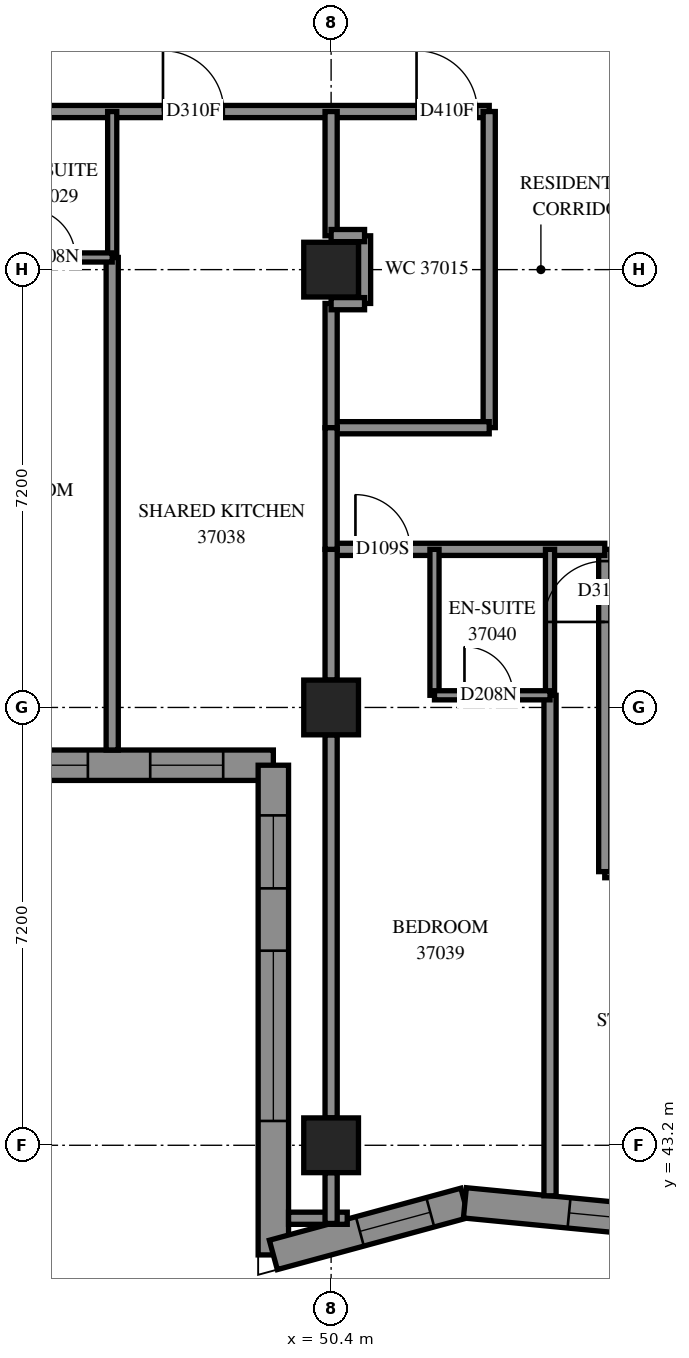
"""IFC4 building model, lengths in metres.
Left out: names, types, materials, properties, quantities, classifications, styles, units other than length and angle.
Written with IfcOpenShell. Run it as: python <this file> out.ifc"""

import sys

from ifc_helpers import new_model, si_unit, direction, frame, frame_2d, origin, origin_2d, place, context, subcontext, project, spatial, polyline, rectangle, outline, extrude, element, fill, save


model = new_model("IFC4")
c1 = context("Model", 3, precision=1e-05, world=origin(), true_north=direction((0.0, 1.0)))
c2 = subcontext(c1, "Body", "Model", "MODEL_VIEW")
j1 = project(units=[si_unit("LENGTHUNIT", "METRE"), si_unit("PLANEANGLEUNIT", "RADIAN")], contexts=[c1])
p1 = place(None, origin())
s1 = spatial("IfcSite", under=j1, at=p1, CompositionType="ELEMENT")
p2 = place(p1, origin())
s2 = spatial("IfcBuilding", under=s1, at=p2, CompositionType="ELEMENT")
p3 = place(p2, frame((0.0, 0.0, 138.8)))
s3 = spatial("IfcBuildingStorey", under=s2, at=p3, CompositionType="ELEMENT", Elevation=138.8)
for number, where, z_axis, x_axis in (
    (1, (50.4, 43.2, 0.0), (0.0, 0.0, 1.0), (1.0, 0.0, 0.0)),
    (2, (50.4, 50.4, 0.0), (0.0, 0.0, 1.0), (1.0, 0.0, 0.0)),
    (3, (50.4, 57.6, 0.0), (0.0, 0.0, 1.0), (1.0, 0.0, 0.0)),
):
    element("IfcColumn", number, at=place(p3, frame(where, z_axis=z_axis, x_axis=x_axis)), inside=s3, PredefinedType="COLUMN", context=c2, shape_type="SweptSolid", body=[
        extrude(rectangle(XDim=0.9, YDim=0.9, at=origin_2d()), origin(), (0.0, 0.0, 1.0), 3.1),
    ])
p4 = place(p3, frame((42.25, 49.45, 0.0), z_axis=(0.0, 0.0, 1.0), x_axis=(1.0, 0.0, 0.0)))
e4 = element("IfcWall", 4, at=p4, inside=s3, PredefinedType="SOLIDWALL", context=c2, shape_type="SweptSolid", body=[
    extrude(outline(polyline([(-0.25, -0.25), (6.95, -0.25), (7.45, 0.25), (0.25, 0.25), (-0.25, -0.25)])), origin(), (0.0, 0.0, 1.0), 3.1),
])
p5 = place(p4, frame((1.35, 0.0, 0.45)))
e5 = element("IfcOpeningElement", 5, at=p5, cuts=e4, PredefinedType="OPENING", context=c2, shape_type="SweptSolid", body=[
    extrude(rectangle(XDim=2.8, YDim=2.5, at=frame_2d((1.4, 1.25))), frame((0.0, 0.26, 0.0), z_axis=(0.0, -1.0, 0.0), x_axis=(1.0, 0.0, 0.0)), (0.0, 0.0, 1.0), 0.52),
])
p6 = place(p4, frame((5.175, 0.0, 0.45)))
e6 = element("IfcOpeningElement", 6, at=p6, cuts=e4, PredefinedType="OPENING", context=c2, shape_type="SweptSolid", body=[
    extrude(rectangle(XDim=1.2, YDim=2.5, at=frame_2d((0.6, 1.25))), frame((0.0, 0.26, 0.0), z_axis=(0.0, -1.0, 0.0), x_axis=(1.0, 0.0, 0.0)), (0.0, 0.0, 1.0), 0.52),
])
p7 = place(p3, frame((49.45, 49.45, 0.0), z_axis=(0.0, 0.0, 1.0), x_axis=(0.0, -1.0, 0.0)))
e7 = element("IfcWall", 7, at=p7, inside=s3, PredefinedType="SOLIDWALL", context=c2, shape_type="SweptSolid", body=[
    extrude(outline(polyline([(0.25, -0.25), (8.38, -0.25), (7.726, 0.25), (-0.25, 0.25), (0.25, -0.25)])), origin(), (0.0, 0.0, 1.0), 3.1),
])
p8 = place(p7, frame((3.05, 0.0, 0.45)))
e8 = element("IfcOpeningElement", 8, at=p8, cuts=e7, PredefinedType="OPENING", context=c2, shape_type="SweptSolid", body=[
    extrude(rectangle(XDim=2.8, YDim=2.5, at=frame_2d((1.4, 1.25))), frame((0.0, 0.26, 0.0), z_axis=(0.0, -1.0, 0.0), x_axis=(1.0, 0.0, 0.0)), (0.0, 0.0, 1.0), 0.52),
])
p9 = place(p7, frame((0.825, 0.0, 0.45)))
e9 = element("IfcOpeningElement", 9, at=p9, cuts=e7, PredefinedType="OPENING", context=c2, shape_type="SweptSolid", body=[
    extrude(rectangle(XDim=1.2, YDim=2.5, at=frame_2d((0.6, 1.25))), frame((0.0, 0.26, 0.0), z_axis=(0.0, -1.0, 0.0), x_axis=(1.0, 0.0, 0.0)), (0.0, 0.0, 1.0), 0.52),
])
p10 = place(p3, frame((49.45, 41.397, 0.0), z_axis=(0.0, 0.0, 1.0), x_axis=(0.9649861719, 0.2623007589, 0.0)))
e10 = element("IfcWall", 10, at=p10, inside=s3, PredefinedType="SOLIDWALL", context=c2, shape_type="SweptSolid", body=[
    extrude(outline(polyline([(-0.327, -0.25), (3.219, -0.25), (3.31, 0.25), (0.327, 0.25), (-0.327, -0.25)])), origin(), (0.0, 0.0, 1.0), 3.1),
])
p11 = place(p10, frame((1.474, 0.0, 0.45)))
e11 = element("IfcOpeningElement", 11, at=p11, cuts=e10, PredefinedType="OPENING", context=c2, shape_type="SweptSolid", body=[
    extrude(rectangle(XDim=1.2, YDim=2.5, at=frame_2d((0.6, 1.25))), frame((0.0, 0.26, 0.0), z_axis=(0.0, -1.0, 0.0), x_axis=(1.0, 0.0, 0.0)), (0.0, 0.0, 1.0), 0.52),
])
p12 = place(p3, frame((52.6, 42.253, 0.0), z_axis=(0.0, 0.0, 1.0), x_axis=(0.9953825051, -0.0959878563, 0.0)))
e12 = element("IfcWall", 12, at=p12, inside=s3, PredefinedType="SOLIDWALL", context=c2, shape_type="SweptSolid", body=[
    extrude(outline(polyline([(0.046, -0.25), (3.483, -0.25), (3.435, 0.25), (-0.046, 0.25), (0.046, -0.25)])), origin(), (0.0, 0.0, 1.0), 3.1),
])
p13 = place(p12, frame((1.721, 0.0, 0.45)))
e13 = element("IfcOpeningElement", 13, at=p13, cuts=e12, PredefinedType="OPENING", context=c2, shape_type="SweptSolid", body=[
    extrude(rectangle(XDim=1.2, YDim=2.5, at=frame_2d((0.6, 1.25))), frame((0.0, 0.26, 0.0), z_axis=(0.0, -1.0, 0.0), x_axis=(1.0, 0.0, 0.0)), (0.0, 0.0, 1.0), 0.52),
])
p14 = place(p3, frame((54.9, 47.7, 0.0), z_axis=(0.0, 0.0, 1.0), x_axis=(1.0, 0.0, 0.0)))
e14 = element("IfcWall", 14, at=p14, inside=s3, PredefinedType="PARTITIONING", context=c2, shape_type="SweptSolid", body=[
    extrude(rectangle(XDim=19.326, YDim=0.2, at=frame_2d((9.663, 0.0))), origin(), (0.0, 0.0, 1.0), 3.1),
])
p15 = place(p14, frame((5.0, 0.0, 0.0)))
e15 = element("IfcOpeningElement", 15, at=p15, cuts=e14, PredefinedType="OPENING", context=c2, shape_type="SweptSolid", body=[
    extrude(rectangle(XDim=0.9, YDim=2.1, at=frame_2d((0.45, 1.05))), frame((0.0, 0.11, 0.0), z_axis=(0.0, -1.0, 0.0), x_axis=(1.0, 0.0, 0.0)), (0.0, 0.0, 1.0), 0.22),
])
p16 = place(p14, frame((12.2, 0.0, 0.0)))
e16 = element("IfcOpeningElement", 16, at=p16, cuts=e14, PredefinedType="OPENING", context=c2, shape_type="SweptSolid", body=[
    extrude(rectangle(XDim=0.9, YDim=2.1, at=frame_2d((0.45, 1.05))), frame((0.0, 0.11, 0.0), z_axis=(0.0, -1.0, 0.0), x_axis=(1.0, 0.0, 0.0)), (0.0, 0.0, 1.0), 0.22),
])
p17 = place(p14, frame((6.7, 0.0, 0.0)))
e17 = element("IfcOpeningElement", 17, at=p17, cuts=e14, PredefinedType="OPENING", context=c2, shape_type="SweptSolid", body=[
    extrude(rectangle(XDim=0.9, YDim=2.1, at=frame_2d((0.45, 1.05))), frame((0.0, 0.11, 0.0), z_axis=(0.0, -1.0, 0.0), x_axis=(1.0, 0.0, 0.0)), (0.0, 0.0, 1.0), 0.22),
])
p18 = place(p14, frame((13.9, 0.0, 0.0)))
e18 = element("IfcOpeningElement", 18, at=p18, cuts=e14, PredefinedType="OPENING", context=c2, shape_type="SweptSolid", body=[
    extrude(rectangle(XDim=0.9, YDim=2.1, at=frame_2d((0.45, 1.05))), frame((0.0, 0.11, 0.0), z_axis=(0.0, -1.0, 0.0), x_axis=(1.0, 0.0, 0.0)), (0.0, 0.0, 1.0), 0.22),
])
p19 = place(p3, frame((36.0, 60.2, 0.0), z_axis=(0.0, 0.0, 1.0), x_axis=(1.0, 0.0, 0.0)))
e19 = element("IfcWall", 19, at=p19, inside=s3, PredefinedType="PARTITIONING", context=c2, shape_type="SweptSolid", body=[
    extrude(rectangle(XDim=17.0, YDim=0.2, at=frame_2d((8.5, 0.0))), origin(), (0.0, 0.0, 1.0), 3.1),
])
p20 = place(p19, frame((15.805, 0.0, 0.0)))
e20 = element("IfcOpeningElement", 20, at=p20, cuts=e19, PredefinedType="OPENING", context=c2, shape_type="SweptSolid", body=[
    extrude(rectangle(XDim=1.0, YDim=2.1, at=frame_2d((0.5, 1.05))), frame((0.0, 0.11, 0.0), z_axis=(0.0, -1.0, 0.0), x_axis=(1.0, 0.0, 0.0)), (0.0, 0.0, 1.0), 0.22),
])
p21 = place(p19, frame((4.125, 0.0, 0.0)))
e21 = element("IfcOpeningElement", 21, at=p21, cuts=e19, PredefinedType="OPENING", context=c2, shape_type="SweptSolid", body=[
    extrude(rectangle(XDim=1.0, YDim=2.1, at=frame_2d((0.5, 1.05))), frame((0.0, 0.11, 0.0), z_axis=(0.0, -1.0, 0.0), x_axis=(1.0, 0.0, 0.0)), (0.0, 0.0, 1.0), 0.22),
])
p22 = place(p19, frame((7.55, 0.0, 0.0)))
e22 = element("IfcOpeningElement", 22, at=p22, cuts=e19, PredefinedType="OPENING", context=c2, shape_type="SweptSolid", body=[
    extrude(rectangle(XDim=0.9, YDim=2.1, at=frame_2d((0.45, 1.05))), frame((0.0, 0.11, 0.0), z_axis=(0.0, -1.0, 0.0), x_axis=(1.0, 0.0, 0.0)), (0.0, 0.0, 1.0), 0.22),
])
p23 = place(p19, frame((11.635, 0.0, 0.0)))
e23 = element("IfcOpeningElement", 23, at=p23, cuts=e19, PredefinedType="OPENING", context=c2, shape_type="SweptSolid", body=[
    extrude(rectangle(XDim=1.0, YDim=2.1, at=frame_2d((0.5, 1.05))), frame((0.0, 0.11, 0.0), z_axis=(0.0, -1.0, 0.0), x_axis=(1.0, 0.0, 0.0)), (0.0, 0.0, 1.0), 0.22),
])
p24 = place(p3, frame((54.0, 42.369, 0.0), z_axis=(0.0, 0.0, 1.0), x_axis=(0.0, 1.0, 0.0)))
e24 = element("IfcWall", 24, at=p24, inside=s3, PredefinedType="PARTITIONING", context=c2, shape_type="SweptSolid", body=[
    extrude(rectangle(XDim=8.231, YDim=0.2, at=frame_2d((4.115, 0.0))), origin(), (0.0, 0.0, 1.0), 3.1),
])
p25 = place(p3, frame((46.8, 49.7, 0.0), z_axis=(0.0, 0.0, 1.0), x_axis=(0.0, 1.0, 0.0)))
e25 = element("IfcWall", 25, at=p25, inside=s3, PredefinedType="PARTITIONING", context=c2, shape_type="SweptSolid", body=[
    extrude(rectangle(XDim=8.1, YDim=0.2, at=frame_2d((4.05, 0.0))), origin(), (0.0, 0.0, 1.0), 3.1),
])
p26 = place(p3, frame((50.4, 43.65, 0.0), z_axis=(0.0, 0.0, 1.0), x_axis=(0.0, 1.0, 0.0)))
e26 = element("IfcWall", 26, at=p26, inside=s3, PredefinedType="PARTITIONING", context=c2, shape_type="SweptSolid", body=[
    extrude(rectangle(XDim=6.3, YDim=0.2, at=frame_2d((3.15, 0.0))), origin(), (0.0, 0.0, 1.0), 2.6),
])
p27 = place(p3, frame((54.9, 47.7, 0.0), z_axis=(0.0, 0.0, 1.0), x_axis=(0.0, 1.0, 0.0)))
e27 = element("IfcWall", 27, at=p27, inside=s3, PredefinedType="PARTITIONING", context=c2, shape_type="SweptSolid", body=[
    extrude(rectangle(XDim=5.3, YDim=0.2, at=frame_2d((2.65, 0.0))), origin(), (0.0, 0.0, 1.0), 3.1),
])
p28 = place(p27, frame((4.106, 0.0, 0.0)))
e28 = element("IfcOpeningElement", 28, at=p28, cuts=e27, PredefinedType="OPENING", context=c2, shape_type="SweptSolid", body=[
    extrude(rectangle(XDim=1.0, YDim=2.1, at=frame_2d((0.5, 1.05))), frame((0.0, 0.11, 0.0), z_axis=(0.0, -1.0, 0.0), x_axis=(1.0, 0.0, 0.0)), (0.0, 0.0, 1.0), 0.22),
])
p29 = place(p3, frame((53.0, 55.002, 0.0), z_axis=(0.0, 0.0, 1.0), x_axis=(0.0, 1.0, 0.0)))
e29 = element("IfcWall", 29, at=p29, inside=s3, PredefinedType="PARTITIONING", context=c2, shape_type="SweptSolid", body=[
    extrude(rectangle(XDim=5.198, YDim=0.2, at=frame_2d((2.599, 0.0))), origin(), (0.0, 0.0, 1.0), 3.1),
])
p30 = place(p3, frame((50.4, 53.0, 0.0), z_axis=(0.0, 0.0, 1.0), x_axis=(1.0, 0.0, 0.0)))
e30 = element("IfcWall", 30, at=p30, inside=s3, PredefinedType="PARTITIONING", context=c2, shape_type="SweptSolid", body=[
    extrude(rectangle(XDim=4.5, YDim=0.2, at=frame_2d((2.25, 0.0))), origin(), (0.0, 0.0, 1.0), 3.1),
])
p31 = place(p30, frame((0.4, 0.0, 0.0)))
e31 = element("IfcOpeningElement", 31, at=p31, cuts=e30, PredefinedType="OPENING", context=c2, shape_type="SweptSolid", body=[
    extrude(rectangle(XDim=0.9, YDim=2.1, at=frame_2d((0.45, 1.05))), frame((0.0, 0.11, 0.0), z_axis=(0.0, -1.0, 0.0), x_axis=(1.0, 0.0, 0.0)), (0.0, 0.0, 1.0), 0.22),
])
p32 = place(p3, frame((50.4, 55.0, 0.0), z_axis=(0.0, 0.0, 1.0), x_axis=(1.0, 0.0, 0.0)))
e32 = element("IfcWall", 32, at=p32, inside=s3, PredefinedType="PARTITIONING", context=c2, shape_type="SweptSolid", body=[
    extrude(rectangle(XDim=2.6, YDim=0.2, at=frame_2d((1.3, 0.0))), origin(), (0.0, 0.0, 1.0), 3.1),
])
for number, where, z_axis, x_axis in (
    (33, (46.8, 57.8, 0.0), (0.0, 0.0, 1.0), (0.0, 1.0, 0.0)),
    (34, (52.1, 50.6, 0.0), (0.0, 0.0, 1.0), (0.0, 1.0, 0.0)),
    (35, (54.0, 50.6, 0.0), (0.0, 0.0, 1.0), (0.0, 1.0, 0.0)),
):
    element("IfcWall", number, at=place(p3, frame(where, z_axis=z_axis, x_axis=x_axis)), inside=s3, PredefinedType="PARTITIONING", context=c2, shape_type="SweptSolid", body=[
        extrude(rectangle(XDim=2.4, YDim=0.15, at=frame_2d((1.2, 0.0))), origin(), (0.0, 0.0, 1.0), 3.1),
    ])
p33 = place(p3, frame((50.4, 50.85, 0.0), z_axis=(0.0, 0.0, 1.0), x_axis=(0.0, 1.0, 0.0)))
e36 = element("IfcWall", 36, at=p33, inside=s3, PredefinedType="PARTITIONING", context=c2, shape_type="SweptSolid", body=[
    extrude(rectangle(XDim=2.15, YDim=0.2, at=frame_2d((1.075, 0.0))), origin(), (0.0, 0.0, 1.0), 3.1),
])
for number, where, z_axis, x_axis in (
    (37, (50.4, 58.156, 0.0), (0.0, 0.0, 1.0), (0.0, 1.0, 0.0)),
    (38, (50.4, 55.0, 0.0), (0.0, 0.0, 1.0), (0.0, 1.0, 0.0)),
):
    element("IfcWall", number, at=place(p3, frame(where, z_axis=z_axis, x_axis=x_axis)), inside=s3, PredefinedType="PARTITIONING", context=c2, shape_type="SweptSolid", body=[
        extrude(rectangle(XDim=2.044, YDim=0.2, at=frame_2d((1.022, 0.0))), origin(), (0.0, 0.0, 1.0), 3.1),
    ])
p34 = place(p3, frame((50.4, 53.0, 0.0), z_axis=(0.0, 0.0, 1.0), x_axis=(0.0, 1.0, 0.0)))
e39 = element("IfcWall", 39, at=p34, inside=s3, PredefinedType="PARTITIONING", context=c2, shape_type="SweptSolid", body=[
    extrude(rectangle(XDim=2.0, YDim=0.2, at=frame_2d((1.0, 0.0))), origin(), (0.0, 0.0, 1.0), 3.1),
])
p35 = place(p3, frame((44.9, 57.8, 0.0), z_axis=(0.0, 0.0, 1.0), x_axis=(1.0, 0.0, 0.0)))
e40 = element("IfcWall", 40, at=p35, inside=s3, PredefinedType="PARTITIONING", context=c2, shape_type="SweptSolid", body=[
    extrude(rectangle(XDim=1.9, YDim=0.15, at=frame_2d((0.95, 0.0))), origin(), (0.0, 0.0, 1.0), 3.1),
])
p36 = place(p35, frame((0.493, 0.0, 0.0)))
e41 = element("IfcOpeningElement", 41, at=p36, cuts=e40, PredefinedType="OPENING", context=c2, shape_type="SweptSolid", body=[
    extrude(rectangle(XDim=0.8, YDim=2.1, at=frame_2d((0.4, 1.05))), frame((0.0, 0.085, 0.0), z_axis=(0.0, -1.0, 0.0), x_axis=(1.0, 0.0, 0.0)), (0.0, 0.0, 1.0), 0.17),
])
p37 = place(p3, frame((52.1, 50.6, 0.0), z_axis=(0.0, 0.0, 1.0), x_axis=(1.0, 0.0, 0.0)))
e42 = element("IfcWall", 42, at=p37, inside=s3, PredefinedType="PARTITIONING", context=c2, shape_type="SweptSolid", body=[
    extrude(rectangle(XDim=1.9, YDim=0.15, at=frame_2d((0.95, 0.0))), origin(), (0.0, 0.0, 1.0), 3.1),
])
p38 = place(p37, frame((0.493, 0.0, 0.0)))
e43 = element("IfcOpeningElement", 43, at=p38, cuts=e42, PredefinedType="OPENING", context=c2, shape_type="SweptSolid", body=[
    extrude(rectangle(XDim=0.8, YDim=2.1, at=frame_2d((0.4, 1.05))), frame((0.0, 0.085, 0.0), z_axis=(0.0, -1.0, 0.0), x_axis=(1.0, 0.0, 0.0)), (0.0, 0.0, 1.0), 0.17),
])
p39 = place(p3, frame((50.95, 57.044, 0.0), z_axis=(0.0, 0.0, 1.0), x_axis=(0.0, 1.0, 0.0)))
e44 = element("IfcWall", 44, at=p39, inside=s3, PredefinedType="PARTITIONING", context=c2, shape_type="SweptSolid", body=[
    extrude(rectangle(XDim=1.112, YDim=0.2, at=frame_2d((0.556, 0.0))), origin(), (0.0, 0.0, 1.0), 3.1),
])
p40 = place(p3, frame((49.7, 42.0, 0.0), z_axis=(0.0, 0.0, 1.0), x_axis=(1.0, 0.0, 0.0)))
e45 = element("IfcWall", 45, at=p40, inside=s3, PredefinedType="PARTITIONING", context=c2, shape_type="SweptSolid", body=[
    extrude(rectangle(XDim=0.965, YDim=0.2, at=frame_2d((0.483, 0.0))), origin(), (0.0, 0.0, 1.0), 3.1),
])
p41 = place(p3, frame((50.4, 41.914, 0.0), z_axis=(0.0, 0.0, 1.0), x_axis=(0.0, 1.0, 0.0)))
e46 = element("IfcWall", 46, at=p41, inside=s3, PredefinedType="PARTITIONING", context=c2, shape_type="SweptSolid", body=[
    extrude(rectangle(XDim=0.836, YDim=0.2, at=frame_2d((0.418, 0.0))), origin(), (0.0, 0.0, 1.0), 3.1),
])
for number, where, z_axis, x_axis in (
    (47, (50.4, 57.04, 0.0), (0.0, 0.0, 1.0), (1.0, 0.0, 0.0)),
    (48, (50.4, 58.16, 0.0), (0.0, 0.0, 1.0), (1.0, 0.0, 0.0)),
):
    element("IfcWall", number, at=place(p3, frame(where, z_axis=z_axis, x_axis=x_axis)), inside=s3, PredefinedType="PARTITIONING", context=c2, shape_type="SweptSolid", body=[
        extrude(rectangle(XDim=0.55, YDim=0.2, at=frame_2d((0.275, 0.0))), origin(), (0.0, 0.0, 1.0), 3.1),
    ])
p42 = place(p5, origin())
e49 = element("IfcWindow", 49, at=p42, inside=s3, PartitioningType="SINGLE_PANEL", PredefinedType="WINDOW", context=c2, shape_type="SweptSolid", body=[
    extrude(rectangle(XDim=2.8, YDim=2.5, at=frame_2d((1.4, 1.25))), frame((0.0, 0.18, 0.0), z_axis=(0.0, -1.0, 0.0), x_axis=(1.0, 0.0, 0.0)), (0.0, 0.0, 1.0), 0.06),
])
fill(e5, e49)
p43 = place(p6, origin())
e50 = element("IfcWindow", 50, at=p43, inside=s3, PartitioningType="SINGLE_PANEL", PredefinedType="WINDOW", context=c2, shape_type="SweptSolid", body=[
    extrude(rectangle(XDim=1.2, YDim=2.5, at=frame_2d((0.6, 1.25))), frame((0.0, 0.18, 0.0), z_axis=(0.0, -1.0, 0.0), x_axis=(1.0, 0.0, 0.0)), (0.0, 0.0, 1.0), 0.06),
])
fill(e6, e50)
p44 = place(p8, origin())
e51 = element("IfcWindow", 51, at=p44, inside=s3, PartitioningType="SINGLE_PANEL", PredefinedType="WINDOW", context=c2, shape_type="SweptSolid", body=[
    extrude(rectangle(XDim=2.8, YDim=2.5, at=frame_2d((1.4, 1.25))), frame((0.0, 0.18, 0.0), z_axis=(0.0, -1.0, 0.0), x_axis=(1.0, 0.0, 0.0)), (0.0, 0.0, 1.0), 0.06),
])
fill(e8, e51)
p45 = place(p9, origin())
e52 = element("IfcWindow", 52, at=p45, inside=s3, PartitioningType="SINGLE_PANEL", PredefinedType="WINDOW", context=c2, shape_type="SweptSolid", body=[
    extrude(rectangle(XDim=1.2, YDim=2.5, at=frame_2d((0.6, 1.25))), frame((0.0, 0.18, 0.0), z_axis=(0.0, -1.0, 0.0), x_axis=(1.0, 0.0, 0.0)), (0.0, 0.0, 1.0), 0.06),
])
fill(e9, e52)
p46 = place(p11, origin())
e53 = element("IfcWindow", 53, at=p46, inside=s3, PartitioningType="SINGLE_PANEL", PredefinedType="WINDOW", context=c2, shape_type="SweptSolid", body=[
    extrude(rectangle(XDim=1.2, YDim=2.5, at=frame_2d((0.6, 1.25))), frame((0.0, 0.18, 0.0), z_axis=(0.0, -1.0, 0.0), x_axis=(1.0, 0.0, 0.0)), (0.0, 0.0, 1.0), 0.06),
])
fill(e11, e53)
p47 = place(p13, origin())
e54 = element("IfcWindow", 54, at=p47, inside=s3, PartitioningType="SINGLE_PANEL", PredefinedType="WINDOW", context=c2, shape_type="SweptSolid", body=[
    extrude(rectangle(XDim=1.2, YDim=2.5, at=frame_2d((0.6, 1.25))), frame((0.0, 0.18, 0.0), z_axis=(0.0, -1.0, 0.0), x_axis=(1.0, 0.0, 0.0)), (0.0, 0.0, 1.0), 0.06),
])
fill(e13, e54)
p48 = place(p20, origin())
e55 = element("IfcDoor", 55, at=p48, inside=s3, OperationType="SINGLE_SWING_LEFT", PredefinedType="DOOR", context=c2, shape_type="SweptSolid", body=[
    extrude(rectangle(XDim=1.0, YDim=2.1, at=frame_2d((0.5, 1.05))), frame((0.0, 0.025, 0.0), z_axis=(0.0, -1.0, 0.0), x_axis=(1.0, 0.0, 0.0)), (0.0, 0.0, 1.0), 0.05),
])
fill(e20, e55)
p49 = place(p36, origin())
e56 = element("IfcDoor", 56, at=p49, inside=s3, OperationType="SINGLE_SWING_RIGHT", PredefinedType="DOOR", context=c2, shape_type="SweptSolid", body=[
    extrude(rectangle(XDim=0.8, YDim=2.1, at=frame_2d((0.4, 1.05))), frame((0.0, 0.025, 0.0), z_axis=(0.0, -1.0, 0.0), x_axis=(1.0, 0.0, 0.0)), (0.0, 0.0, 1.0), 0.05),
])
fill(e41, e56)
p50 = place(p23, origin())
e57 = element("IfcDoor", 57, at=p50, inside=s3, OperationType="SINGLE_SWING_RIGHT", PredefinedType="DOOR", context=c2, shape_type="SweptSolid", body=[
    extrude(rectangle(XDim=1.0, YDim=2.1, at=frame_2d((0.5, 1.05))), frame((0.0, 0.025, 0.0), z_axis=(0.0, -1.0, 0.0), x_axis=(1.0, 0.0, 0.0)), (0.0, 0.0, 1.0), 0.05),
])
fill(e23, e57)
p51 = place(p31, origin())
e58 = element("IfcDoor", 58, at=p51, inside=s3, OperationType="SINGLE_SWING_LEFT", PredefinedType="DOOR", context=c2, shape_type="SweptSolid", body=[
    extrude(rectangle(XDim=0.9, YDim=2.1, at=frame_2d((0.45, 1.05))), frame((0.0, 0.025, 0.0), z_axis=(0.0, -1.0, 0.0), x_axis=(1.0, 0.0, 0.0)), (0.0, 0.0, 1.0), 0.05),
])
fill(e31, e58)
p52 = place(p38, origin())
e59 = element("IfcDoor", 59, at=p52, inside=s3, OperationType="SINGLE_SWING_RIGHT", PredefinedType="DOOR", context=c2, shape_type="SweptSolid", body=[
    extrude(rectangle(XDim=0.8, YDim=2.1, at=frame_2d((0.4, 1.05))), frame((0.0, 0.025, 0.0), z_axis=(0.0, -1.0, 0.0), x_axis=(1.0, 0.0, 0.0)), (0.0, 0.0, 1.0), 0.05),
])
fill(e43, e59)
p53 = place(p28, origin())
e60 = element("IfcDoor", 60, at=p53, inside=s3, OperationType="SINGLE_SWING_RIGHT", PredefinedType="DOOR", context=c2, shape_type="SweptSolid", body=[
    extrude(rectangle(XDim=1.0, YDim=2.1, at=frame_2d((0.5, 1.05))), frame((0.0, 0.025, 0.0), z_axis=(0.0, -1.0, 0.0), x_axis=(1.0, 0.0, 0.0)), (0.0, 0.0, 1.0), 0.05),
])
fill(e28, e60)
save(model, sys.argv[1])
